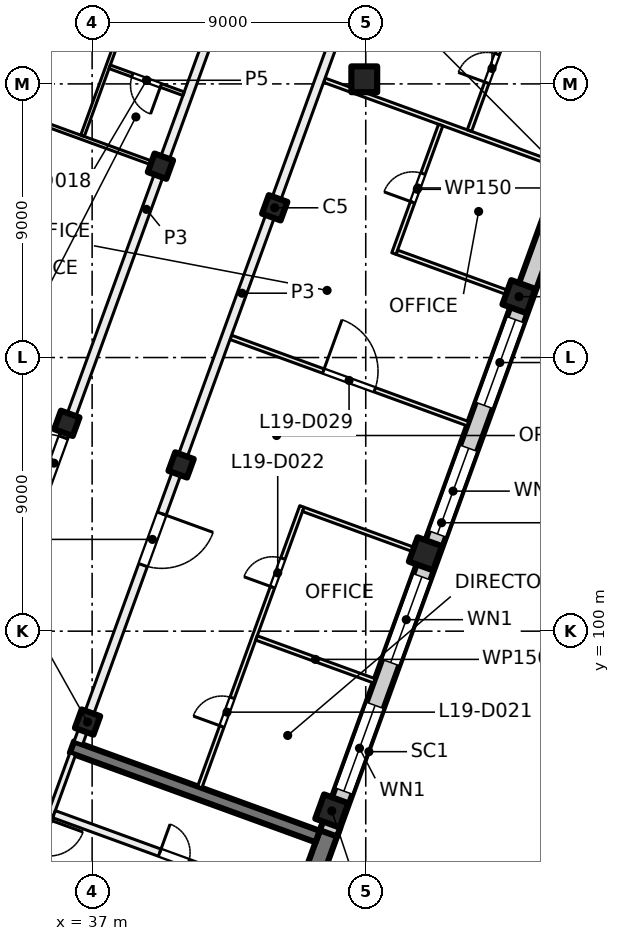
"""IFC4 building model, lengths in metres.
Left out: names, types, materials, properties, quantities, classifications, styles, units other than length and angle.
Written with IfcOpenShell. Run it as: python <this file> out.ifc"""

import sys

from ifc_helpers import new_model, si_unit, direction, frame, frame_2d, origin, origin_2d, place, context, subcontext, project, spatial, rectangle, extrude, element, fill, save


model = new_model("IFC4")
c1 = context("Model", 3, precision=1e-05, world=origin(), true_north=direction((0.0, 1.0)))
c2 = subcontext(c1, "Body", "Model", "MODEL_VIEW")
j1 = project(units=[si_unit("LENGTHUNIT", "METRE"), si_unit("PLANEANGLEUNIT", "RADIAN")], contexts=[c1])
p1 = place(None, origin())
s1 = spatial("IfcSite", under=j1, at=p1, CompositionType="ELEMENT")
p2 = place(p1, origin())
s2 = spatial("IfcBuilding", under=s1, at=p2, CompositionType="ELEMENT")
p3 = place(p2, frame((0.0, 0.0, 85.0)))
s3 = spatial("IfcBuildingStorey", under=s2, at=p3, CompositionType="ELEMENT", Elevation=85.0)
p4 = place(p3, frame((45.952, 118.152, 0.0), z_axis=(0.0, 0.0, 1.0), x_axis=(1.0, 0.0, 0.0)))
e1 = element("IfcColumn", 1, at=p4, inside=s3, PredefinedType="COLUMN", context=c2, shape_type="SweptSolid", body=[
    extrude(rectangle(XDim=0.85, YDim=0.85, at=origin_2d()), origin(), (0.0, 0.0, 1.0), 4.0),
])
for number, where, z_axis, x_axis in (
    (2, (43.006, 113.925, 0.0), (0.0, 0.0, 1.0), (-0.342, -0.94, 0.0)),
    (3, (39.927, 105.468, 0.0), (0.0, 0.0, 1.0), (-0.342, -0.94, 0.0)),
    (4, (36.849, 97.011, 0.0), (0.0, 0.0, 1.0), (-0.342, -0.94, 0.0)),
    (5, (39.247, 115.293, 0.0), (0.0, 0.0, 1.0), (-0.342, -0.94, 0.0)),
    (6, (36.169, 106.836, 0.0), (0.0, 0.0, 1.0), (-0.342, -0.94, 0.0)),
):
    element("IfcColumn", number, at=place(p3, frame(where, z_axis=z_axis, x_axis=x_axis)), inside=s3, PredefinedType="COLUMN", context=c2, shape_type="SweptSolid", body=[
        extrude(rectangle(XDim=0.65, YDim=0.65, at=origin_2d()), origin(), (0.0, 0.0, 1.0), 4.0),
    ])
for number, where, z_axis, x_axis in (
    (7, (51.04, 111.001, 0.0), (0.0, 0.0, 1.0), (-0.342, -0.94, 0.0)),
    (8, (47.962, 102.544, 0.0), (0.0, 0.0, 1.0), (-0.342, -0.94, 0.0)),
    (9, (44.884, 94.087, 0.0), (0.0, 0.0, 1.0), (-0.342, -0.94, 0.0)),
):
    element("IfcColumn", number, at=place(p3, frame(where, z_axis=z_axis, x_axis=x_axis)), inside=s3, PredefinedType="COLUMN", context=c2, shape_type="SweptSolid", body=[
        extrude(rectangle(XDim=0.85, YDim=0.85, at=origin_2d()), origin(), (0.0, 0.0, 1.0), 4.0),
    ])
p5 = place(p3, frame((41.827, 85.249, 0.0), z_axis=(0.0, 0.0, 1.0), x_axis=(0.342017595281, 0.939693548195, 0.0)))
e10 = element("IfcWall", 10, at=p5, inside=s3, PredefinedType="SHEAR", context=c2, shape_type="SweptSolid", body=[
    extrude(rectangle(XDim=8.925, YDim=0.6, at=frame_2d((4.462, 0.0))), origin(), (0.0, 0.0, 1.0), 4.0),
])
p6 = place(p3, frame((44.418, 93.245, 0.0), z_axis=(0.0, 0.0, 1.0), x_axis=(-0.93969060187, 0.342025690201, 0.0)))
e11 = element("IfcWall", 11, at=p6, inside=s3, PredefinedType="SHEAR", context=c2, shape_type="SweptSolid", body=[
    extrude(rectangle(XDim=8.6, YDim=0.4, at=frame_2d((4.3, 0.0))), origin(), (0.0, 0.0, 1.0), 4.0),
])
p7 = place(p3, frame((52.212, 113.783, 0.0), z_axis=(0.0, 0.0, 1.0), x_axis=(-0.34202521188, -0.939690775968, 0.0)))
e12 = element("IfcWall", 12, at=p7, inside=s3, PredefinedType="SOLIDWALL", context=c2, shape_type="SweptSolid", body=[
    extrude(rectangle(XDim=21.745, YDim=0.6, at=frame_2d((10.873, 0.0))), origin(), (0.0, 0.0, 1.0), 3.625),
])
p8 = place(p7, frame((3.765, 0.0, 0.9)))
e13 = element("IfcOpeningElement", 13, at=p8, cuts=e12, PredefinedType="OPENING", context=c2, shape_type="SweptSolid", body=[
    extrude(rectangle(XDim=3.0, YDim=2.4, at=frame_2d((1.5, 1.2))), frame((0.0, 0.31, 0.0), z_axis=(0.0, -1.0, 0.0), x_axis=(1.0, 0.0, 0.0)), (0.0, 0.0, 1.0), 0.62),
])
p9 = place(p7, frame((8.265, 0.0, 0.9)))
e14 = element("IfcOpeningElement", 14, at=p9, cuts=e12, PredefinedType="OPENING", context=c2, shape_type="SweptSolid", body=[
    extrude(rectangle(XDim=3.0, YDim=2.4, at=frame_2d((1.5, 1.2))), frame((0.0, 0.31, 0.0), z_axis=(0.0, -1.0, 0.0), x_axis=(1.0, 0.0, 0.0)), (0.0, 0.0, 1.0), 0.62),
])
p10 = place(p7, frame((12.765, 0.0, 0.9)))
e15 = element("IfcOpeningElement", 15, at=p10, cuts=e12, PredefinedType="OPENING", context=c2, shape_type="SweptSolid", body=[
    extrude(rectangle(XDim=3.0, YDim=2.4, at=frame_2d((1.5, 1.2))), frame((0.0, 0.31, 0.0), z_axis=(0.0, -1.0, 0.0), x_axis=(1.0, 0.0, 0.0)), (0.0, 0.0, 1.0), 0.62),
])
p11 = place(p7, frame((17.265, 0.0, 0.9)))
e16 = element("IfcOpeningElement", 16, at=p11, cuts=e12, PredefinedType="OPENING", context=c2, shape_type="SweptSolid", body=[
    extrude(rectangle(XDim=3.0, YDim=2.4, at=frame_2d((1.5, 1.2))), frame((0.0, 0.31, 0.0), z_axis=(0.0, -1.0, 0.0), x_axis=(1.0, 0.0, 0.0)), (0.0, 0.0, 1.0), 0.62),
])
p12 = place(p3, frame((24.666, 100.669, 0.0), z_axis=(0.0, 0.0, 1.0), x_axis=(0.34201964167, 0.939692803373, 0.0)))
e17 = element("IfcWall", 17, at=p12, inside=s3, PredefinedType="SOLIDWALL", context=c2, shape_type="SweptSolid", body=[
    extrude(rectangle(XDim=32.884, YDim=0.6, at=frame_2d((16.442, 0.0))), origin(), (0.0, 0.0, 1.0), 3.625),
])
p13 = place(p12, frame((1.48, 0.0, 0.9)))
e18 = element("IfcOpeningElement", 18, at=p13, cuts=e17, PredefinedType="OPENING", context=c2, shape_type="SweptSolid", body=[
    extrude(rectangle(XDim=3.0, YDim=2.4, at=frame_2d((1.5, 1.2))), frame((0.0, 0.31, 0.0), z_axis=(0.0, -1.0, 0.0), x_axis=(1.0, 0.0, 0.0)), (0.0, 0.0, 1.0), 0.62),
])
p14 = place(p12, frame((5.98, 0.0, 0.9)))
e19 = element("IfcOpeningElement", 19, at=p14, cuts=e17, PredefinedType="OPENING", context=c2, shape_type="SweptSolid", body=[
    extrude(rectangle(XDim=3.0, YDim=2.4, at=frame_2d((1.5, 1.2))), frame((0.0, 0.31, 0.0), z_axis=(0.0, -1.0, 0.0), x_axis=(1.0, 0.0, 0.0)), (0.0, 0.0, 1.0), 0.62),
])
p15 = place(p12, frame((10.48, 0.0, 0.9)))
e20 = element("IfcOpeningElement", 20, at=p15, cuts=e17, PredefinedType="OPENING", context=c2, shape_type="SweptSolid", body=[
    extrude(rectangle(XDim=3.0, YDim=2.4, at=frame_2d((1.5, 1.2))), frame((0.0, 0.31, 0.0), z_axis=(0.0, -1.0, 0.0), x_axis=(1.0, 0.0, 0.0)), (0.0, 0.0, 1.0), 0.62),
])
p16 = place(p12, frame((14.98, 0.0, 0.9)))
e21 = element("IfcOpeningElement", 21, at=p16, cuts=e17, PredefinedType="OPENING", context=c2, shape_type="SweptSolid", body=[
    extrude(rectangle(XDim=3.0, YDim=2.4, at=frame_2d((1.5, 1.2))), frame((0.0, 0.31, 0.0), z_axis=(0.0, -1.0, 0.0), x_axis=(1.0, 0.0, 0.0)), (0.0, 0.0, 1.0), 0.62),
])
p17 = place(p12, frame((19.48, 0.0, 0.9)))
e22 = element("IfcOpeningElement", 22, at=p17, cuts=e17, PredefinedType="OPENING", context=c2, shape_type="SweptSolid", body=[
    extrude(rectangle(XDim=3.0, YDim=2.4, at=frame_2d((1.5, 1.2))), frame((0.0, 0.31, 0.0), z_axis=(0.0, -1.0, 0.0), x_axis=(1.0, 0.0, 0.0)), (0.0, 0.0, 1.0), 0.62),
])
p18 = place(p12, frame((23.98, 0.0, 0.9)))
e23 = element("IfcOpeningElement", 23, at=p18, cuts=e17, PredefinedType="OPENING", context=c2, shape_type="SweptSolid", body=[
    extrude(rectangle(XDim=3.0, YDim=2.4, at=frame_2d((1.5, 1.2))), frame((0.0, 0.31, 0.0), z_axis=(0.0, -1.0, 0.0), x_axis=(1.0, 0.0, 0.0)), (0.0, 0.0, 1.0), 0.62),
])
p19 = place(p12, frame((28.48, 0.0, 0.9)))
e24 = element("IfcOpeningElement", 24, at=p19, cuts=e17, PredefinedType="OPENING", context=c2, shape_type="SweptSolid", body=[
    extrude(rectangle(XDim=3.0, YDim=2.4, at=frame_2d((1.5, 1.2))), frame((0.0, 0.31, 0.0), z_axis=(0.0, -1.0, 0.0), x_axis=(1.0, 0.0, 0.0)), (0.0, 0.0, 1.0), 0.62),
])
p20 = place(p3, frame((36.362, 95.964, 0.0), z_axis=(0.0, 0.0, 1.0), x_axis=(-0.341995824804, -0.939701471648, 0.0)))
e25 = element("IfcWall", 25, at=p20, inside=s3, PredefinedType="PARTITIONING", context=c2, shape_type="SweptSolid", body=[
    extrude(rectangle(XDim=3.8, YDim=0.2, at=frame_2d((1.9, 0.0))), origin(), (0.0, 0.0, 1.0), 3.625),
])
p21 = place(p20, frame((2.3, 0.0, 0.0)))
e26 = element("IfcOpeningElement", 26, at=p21, cuts=e25, PredefinedType="OPENING", context=c2, shape_type="SweptSolid", body=[
    extrude(rectangle(XDim=1.2, YDim=2.1, at=frame_2d((0.6, 1.05))), frame((0.0, 0.11, 0.0), z_axis=(0.0, -1.0, 0.0), x_axis=(1.0, 0.0, 0.0)), (0.0, 0.0, 1.0), 0.22),
])
p22 = place(p3, frame((35.19, 92.453, 0.0), z_axis=(0.0, 0.0, 1.0), x_axis=(0.939691552312, -0.342023078919, 0.0)))
e27 = element("IfcWall", 27, at=p22, inside=s3, PredefinedType="PARTITIONING", context=c2, shape_type="SweptSolid", body=[
    extrude(rectangle(XDim=8.4, YDim=0.2, at=frame_2d((4.2, 0.0))), origin(), (0.0, 0.0, 1.0), 3.625),
])
p23 = place(p22, frame((5.25, 0.0, 0.0)))
e28 = element("IfcOpeningElement", 28, at=p23, cuts=e27, PredefinedType="OPENING", context=c2, shape_type="SweptSolid", body=[
    extrude(rectangle(XDim=1.5, YDim=2.1, at=frame_2d((0.75, 1.05))), frame((0.0, 0.11, 0.0), z_axis=(0.0, -1.0, 0.0), x_axis=(1.0, 0.0, 0.0)), (0.0, 0.0, 1.0), 0.22),
])
p24 = place(p3, frame((35.746, 93.98, 0.0), z_axis=(0.0, 0.0, 1.0), x_axis=(0.939691552312, -0.342023078919, 0.0)))
e29 = element("IfcWall", 29, at=p24, inside=s3, PredefinedType="PARTITIONING", context=c2, shape_type="SweptSolid", body=[
    extrude(rectangle(XDim=8.4, YDim=0.25, at=frame_2d((4.2, 0.0))), origin(), (0.0, 0.0, 1.0), 3.625),
])
p25 = place(p24, frame((3.7, 0.0, 0.0)))
e30 = element("IfcOpeningElement", 30, at=p25, cuts=e29, PredefinedType="OPENING", context=c2, shape_type="SweptSolid", body=[
    extrude(rectangle(XDim=1.0, YDim=2.1, at=frame_2d((0.5, 1.05))), frame((0.0, 0.135, 0.0), z_axis=(0.0, -1.0, 0.0), x_axis=(1.0, 0.0, 0.0)), (0.0, 0.0, 1.0), 0.27),
])
p26 = place(p3, frame((31.353, 118.166, 0.0), z_axis=(0.0, 0.0, 1.0), x_axis=(0.939687752599, -0.342033518263, 0.0)))
e31 = element("IfcWall", 31, at=p26, inside=s3, PredefinedType="PARTITIONING", context=c2, shape_type="SweptSolid", body=[
    extrude(rectangle(XDim=8.301, YDim=0.125, at=frame_2d((4.15, 0.0))), origin(), (0.0, 0.0, 1.0), 3.625),
])
p27 = place(p3, frame((32.881, 97.657, 0.0), z_axis=(0.0, 0.0, 1.0), x_axis=(0.342017360004, 0.939693633828, 0.0)))
e32 = element("IfcWall", 32, at=p27, inside=s3, PredefinedType="PARTITIONING", context=c2, shape_type="SweptSolid", body=[
    extrude(rectangle(XDim=34.516, YDim=0.3, at=frame_2d((17.258, 0.0))), origin(), (0.0, 0.0, 1.0), 3.625),
])
p28 = place(p27, frame((7.475, 0.0, 0.0)))
e33 = element("IfcOpeningElement", 33, at=p28, cuts=e32, PredefinedType="OPENING", context=c2, shape_type="SweptSolid", body=[
    extrude(rectangle(XDim=1.8, YDim=2.1, at=frame_2d((0.9, 1.05))), frame((0.0, 0.16, 0.0), z_axis=(0.0, -1.0, 0.0), x_axis=(1.0, 0.0, 0.0)), (0.0, 0.0, 1.0), 0.32),
])
p29 = place(p27, frame((24.0, 0.0, 0.0)))
e34 = element("IfcOpeningElement", 34, at=p29, cuts=e32, PredefinedType="OPENING", context=c2, shape_type="SweptSolid", body=[
    extrude(rectangle(XDim=1.0, YDim=2.1, at=frame_2d((0.5, 1.05))), frame((0.0, 0.16, 0.0), z_axis=(0.0, -1.0, 0.0), x_axis=(1.0, 0.0, 0.0)), (0.0, 0.0, 1.0), 0.32),
])
p30 = place(p3, frame((36.684, 116.293, 0.0), z_axis=(0.0, 0.0, 1.0), x_axis=(0.342089829483, 0.939667254173, 0.0)))
e35 = element("IfcWall", 35, at=p30, inside=s3, PredefinedType="PARTITIONING", context=c2, shape_type="SweptSolid", body=[
    extrude(rectangle(XDim=8.875, YDim=0.125, at=frame_2d((4.437, 0.0))), origin(), (0.0, 0.0, 1.0), 3.625),
])
p31 = place(p30, frame((6.266, 0.0, 0.0)))
e36 = element("IfcOpeningElement", 36, at=p31, cuts=e35, PredefinedType="OPENING", context=c2, shape_type="SweptSolid", body=[
    extrude(rectangle(XDim=0.8, YDim=2.1, at=frame_2d((0.4, 1.05))), frame((0.0, 0.073, 0.0), z_axis=(0.0, -1.0, 0.0), x_axis=(1.0, 0.0, 0.0)), (0.0, 0.0, 1.0), 0.145),
])
p32 = place(p30, frame((3.036, 0.0, 0.0)))
e37 = element("IfcOpeningElement", 37, at=p32, cuts=e35, PredefinedType="OPENING", context=c2, shape_type="SweptSolid", body=[
    extrude(rectangle(XDim=0.8, YDim=2.1, at=frame_2d((0.4, 1.05))), frame((0.0, 0.073, 0.0), z_axis=(0.0, -1.0, 0.0), x_axis=(1.0, 0.0, 0.0)), (0.0, 0.0, 1.0), 0.145),
])
p33 = place(p3, frame((40.008, 117.677, 0.0), z_axis=(0.0, 0.0, 1.0), x_axis=(-0.939674895655, 0.342068838798, 0.0)))
e38 = element("IfcWall", 38, at=p33, inside=s3, PredefinedType="PARTITIONING", context=c2, shape_type="SweptSolid", body=[
    extrude(rectangle(XDim=2.587, YDim=0.125, at=frame_2d((1.293, 0.0))), origin(), (0.0, 0.0, 1.0), 3.625),
])
p34 = place(p33, frame((0.793, 0.0, 0.0)))
e39 = element("IfcOpeningElement", 39, at=p34, cuts=e38, PredefinedType="OPENING", context=c2, shape_type="SweptSolid", body=[
    extrude(rectangle(XDim=1.0, YDim=2.1, at=frame_2d((0.5, 1.05))), frame((0.0, 0.073, 0.0), z_axis=(0.0, -1.0, 0.0), x_axis=(1.0, 0.0, 0.0)), (0.0, 0.0, 1.0), 0.145),
])
p35 = place(p3, frame((40.539, 94.87, 0.0), z_axis=(0.0, 0.0, 1.0), x_axis=(0.342082231415, 0.939670020247, 0.0)))
e40 = element("IfcWall", 40, at=p35, inside=s3, PredefinedType="PARTITIONING", context=c2, shape_type="SweptSolid", body=[
    extrude(rectangle(XDim=9.825, YDim=0.15, at=frame_2d((4.912, 0.0))), origin(), (0.0, 0.0, 1.0), 3.625),
])
p36 = place(p35, frame((2.125, 0.0, 0.0)))
e41 = element("IfcOpeningElement", 41, at=p36, cuts=e40, PredefinedType="OPENING", context=c2, shape_type="SweptSolid", body=[
    extrude(rectangle(XDim=1.0, YDim=2.1, at=frame_2d((0.5, 1.05))), frame((0.0, 0.085, 0.0), z_axis=(0.0, -1.0, 0.0), x_axis=(1.0, 0.0, 0.0)), (0.0, 0.0, 1.0), 0.17),
])
p37 = place(p35, frame((7.0, 0.0, 0.0)))
e42 = element("IfcOpeningElement", 42, at=p37, cuts=e40, PredefinedType="OPENING", context=c2, shape_type="SweptSolid", body=[
    extrude(rectangle(XDim=1.0, YDim=2.1, at=frame_2d((0.5, 1.05))), frame((0.0, 0.085, 0.0), z_axis=(0.0, -1.0, 0.0), x_axis=(1.0, 0.0, 0.0)), (0.0, 0.0, 1.0), 0.17),
])
p38 = place(p3, frame((41.561, 109.663, 0.0), z_axis=(0.0, 0.0, 1.0), x_axis=(0.939673986983, -0.342071334939, 0.0)))
e43 = element("IfcWall", 43, at=p38, inside=s3, PredefinedType="PARTITIONING", context=c2, shape_type="SweptSolid", body=[
    extrude(rectangle(XDim=8.3, YDim=0.15, at=frame_2d((4.15, 0.0))), origin(), (0.0, 0.0, 1.0), 3.625),
])
p39 = place(p38, frame((3.24, 0.0, 0.0)))
e44 = element("IfcOpeningElement", 44, at=p39, cuts=e43, PredefinedType="OPENING", context=c2, shape_type="SweptSolid", body=[
    extrude(rectangle(XDim=1.8, YDim=2.1, at=frame_2d((0.9, 1.05))), frame((0.0, 0.085, 0.0), z_axis=(0.0, -1.0, 0.0), x_axis=(1.0, 0.0, 0.0)), (0.0, 0.0, 1.0), 0.17),
])
p40 = place(p3, frame((42.405, 99.777, 0.0), z_axis=(0.0, 0.0, 1.0), x_axis=(0.939765774653, -0.341819087808, 0.0)))
e45 = element("IfcWall", 45, at=p40, inside=s3, PredefinedType="PARTITIONING", context=c2, shape_type="SweptSolid", body=[
    extrude(rectangle(XDim=4.125, YDim=0.15, at=frame_2d((2.063, 0.0))), origin(), (0.0, 0.0, 1.0), 3.625),
])
p41 = place(p3, frame((44.639, 118.12, 0.0), z_axis=(0.0, 0.0, 1.0), x_axis=(0.939669707102, -0.342083091593, 0.0)))
e46 = element("IfcWall", 46, at=p41, inside=s3, PredefinedType="PARTITIONING", context=c2, shape_type="SweptSolid", body=[
    extrude(rectangle(XDim=8.589, YDim=0.15, at=frame_2d((4.295, 0.0))), origin(), (0.0, 0.0, 1.0), 3.625),
])
p42 = place(p3, frame((50.899, 111.052, 0.0), z_axis=(0.0, 0.0, 1.0), x_axis=(-0.93970873465, 0.341975867603, 0.0)))
e47 = element("IfcWall", 47, at=p42, inside=s3, PredefinedType="PARTITIONING", context=c2, shape_type="SweptSolid", body=[
    extrude(rectangle(XDim=4.126, YDim=0.15, at=frame_2d((2.063, 0.0))), origin(), (0.0, 0.0, 1.0), 3.625),
])
p43 = place(p3, frame((47.314, 125.909, 0.0), z_axis=(0.0, 0.0, 1.0), x_axis=(-0.342010770371, -0.939696032209, 0.0)))
e48 = element("IfcWall", 48, at=p43, inside=s3, PredefinedType="PARTITIONING", context=c2, shape_type="SweptSolid", body=[
    extrude(rectangle(XDim=31.485, YDim=0.3, at=frame_2d((15.742, 0.0))), origin(), (0.0, 0.0, 1.0), 3.625),
])
p44 = place(p43, frame((23.459, 0.0, 0.0)))
e49 = element("IfcOpeningElement", 49, at=p44, cuts=e48, PredefinedType="OPENING", context=c2, shape_type="SweptSolid", body=[
    extrude(rectangle(XDim=1.8, YDim=2.1, at=frame_2d((0.9, 1.05))), frame((0.0, 0.16, 0.0), z_axis=(0.0, -1.0, 0.0), x_axis=(1.0, 0.0, 0.0)), (0.0, 0.0, 1.0), 0.32),
])
p45 = place(p43, frame((5.484, 0.0, 0.0)))
e50 = element("IfcOpeningElement", 50, at=p45, cuts=e48, PredefinedType="OPENING", context=c2, shape_type="SweptSolid", body=[
    extrude(rectangle(XDim=1.0, YDim=2.1, at=frame_2d((0.5, 1.05))), frame((0.0, 0.16, 0.0), z_axis=(0.0, -1.0, 0.0), x_axis=(1.0, 0.0, 0.0)), (0.0, 0.0, 1.0), 0.32),
])
p46 = place(p3, frame((43.944, 104.006, 0.0), z_axis=(0.0, 0.0, 1.0), x_axis=(0.939689717042, -0.34202812119, 0.0)))
e51 = element("IfcWall", 51, at=p46, inside=s3, PredefinedType="PARTITIONING", context=c2, shape_type="SweptSolid", body=[
    extrude(rectangle(XDim=4.126, YDim=0.15, at=frame_2d((2.063, 0.0))), origin(), (0.0, 0.0, 1.0), 3.625),
])
p47 = place(p3, frame((46.926, 112.419, 0.0), z_axis=(0.0, 0.0, 1.0), x_axis=(0.342056723843, 0.93967930576, 0.0)))
e52 = element("IfcWall", 52, at=p47, inside=s3, PredefinedType="PARTITIONING", context=c2, shape_type="SweptSolid", body=[
    extrude(rectangle(XDim=4.5, YDim=0.15, at=frame_2d((2.25, 0.0))), origin(), (0.0, 0.0, 1.0), 3.625),
])
p48 = place(p47, frame((1.797, 0.0, 0.0)))
e53 = element("IfcOpeningElement", 53, at=p48, cuts=e52, PredefinedType="OPENING", context=c2, shape_type="SweptSolid", body=[
    extrude(rectangle(XDim=1.0, YDim=2.1, at=frame_2d((0.5, 1.05))), frame((0.0, 0.085, 0.0), z_axis=(0.0, -1.0, 0.0), x_axis=(1.0, 0.0, 0.0)), (0.0, 0.0, 1.0), 0.17),
])
p49 = place(p3, frame((49.41, 116.463, 0.0), z_axis=(0.0, 0.0, 1.0), x_axis=(0.341837690029, 0.939759008297, 0.0)))
e54 = element("IfcWall", 54, at=p49, inside=s3, PredefinedType="PARTITIONING", context=c2, shape_type="SweptSolid", body=[
    extrude(rectangle(XDim=4.35, YDim=0.15, at=frame_2d((2.175, 0.0))), origin(), (0.0, 0.0, 1.0), 3.625),
])
p50 = place(p49, frame((1.675, 0.0, 0.0)))
e55 = element("IfcOpeningElement", 55, at=p50, cuts=e54, PredefinedType="OPENING", context=c2, shape_type="SweptSolid", body=[
    extrude(rectangle(XDim=1.0, YDim=2.1, at=frame_2d((0.5, 1.05))), frame((0.0, 0.085, 0.0), z_axis=(0.0, -1.0, 0.0), x_axis=(1.0, 0.0, 0.0)), (0.0, 0.0, 1.0), 0.17),
])
p51 = place(p8, origin())
e56 = element("IfcWindow", 56, at=p51, inside=s3, PartitioningType="SINGLE_PANEL", PredefinedType="WINDOW", context=c2, shape_type="SweptSolid", body=[
    extrude(rectangle(XDim=3.0, YDim=2.4, at=frame_2d((1.5, 1.2))), frame((0.0, 0.03, 0.0), z_axis=(0.0, -1.0, 0.0), x_axis=(1.0, 0.0, 0.0)), (0.0, 0.0, 1.0), 0.06),
])
fill(e13, e56)
p52 = place(p9, origin())
e57 = element("IfcWindow", 57, at=p52, inside=s3, PartitioningType="SINGLE_PANEL", PredefinedType="WINDOW", context=c2, shape_type="SweptSolid", body=[
    extrude(rectangle(XDim=3.0, YDim=2.4, at=frame_2d((1.5, 1.2))), frame((0.0, 0.03, 0.0), z_axis=(0.0, -1.0, 0.0), x_axis=(1.0, 0.0, 0.0)), (0.0, 0.0, 1.0), 0.06),
])
fill(e14, e57)
p53 = place(p10, origin())
e58 = element("IfcWindow", 58, at=p53, inside=s3, PartitioningType="SINGLE_PANEL", PredefinedType="WINDOW", context=c2, shape_type="SweptSolid", body=[
    extrude(rectangle(XDim=3.0, YDim=2.4, at=frame_2d((1.5, 1.2))), frame((0.0, 0.03, 0.0), z_axis=(0.0, -1.0, 0.0), x_axis=(1.0, 0.0, 0.0)), (0.0, 0.0, 1.0), 0.06),
])
fill(e15, e58)
p54 = place(p11, origin())
e59 = element("IfcWindow", 59, at=p54, inside=s3, PartitioningType="SINGLE_PANEL", PredefinedType="WINDOW", context=c2, shape_type="SweptSolid", body=[
    extrude(rectangle(XDim=3.0, YDim=2.4, at=frame_2d((1.5, 1.2))), frame((0.0, 0.03, 0.0), z_axis=(0.0, -1.0, 0.0), x_axis=(1.0, 0.0, 0.0)), (0.0, 0.0, 1.0), 0.06),
])
fill(e16, e59)
p55 = place(p25, origin())
e60 = element("IfcDoor", 60, at=p55, inside=s3, OperationType="SINGLE_SWING_RIGHT", PredefinedType="DOOR", context=c2, shape_type="SweptSolid", body=[
    extrude(rectangle(XDim=1.0, YDim=2.1, at=frame_2d((0.5, 1.05))), frame((0.0, 0.025, 0.0), z_axis=(0.0, -1.0, 0.0), x_axis=(1.0, 0.0, 0.0)), (0.0, 0.0, 1.0), 0.05),
])
fill(e30, e60)
p56 = place(p28, origin())
e61 = element("IfcDoor", 61, at=p56, inside=s3, OperationType="DOUBLE_DOOR_SINGLE_SWING", PredefinedType="DOOR", context=c2, shape_type="SweptSolid", body=[
    extrude(rectangle(XDim=1.8, YDim=2.1, at=frame_2d((0.9, 1.05))), frame((0.0, 0.025, 0.0), z_axis=(0.0, -1.0, 0.0), x_axis=(1.0, 0.0, 0.0)), (0.0, 0.0, 1.0), 0.05),
])
fill(e33, e61)
p57 = place(p34, origin())
e62 = element("IfcDoor", 62, at=p57, inside=s3, OperationType="SINGLE_SWING_LEFT", PredefinedType="DOOR", context=c2, shape_type="SweptSolid", body=[
    extrude(rectangle(XDim=1.0, YDim=2.1, at=frame_2d((0.5, 1.05))), frame((0.0, 0.025, 0.0), z_axis=(0.0, -1.0, 0.0), x_axis=(1.0, 0.0, 0.0)), (0.0, 0.0, 1.0), 0.05),
])
fill(e39, e62)
p58 = place(p36, origin())
e63 = element("IfcDoor", 63, at=p58, inside=s3, OperationType="SINGLE_SWING_LEFT", PredefinedType="DOOR", context=c2, shape_type="SweptSolid", body=[
    extrude(rectangle(XDim=1.0, YDim=2.1, at=frame_2d((0.5, 1.05))), frame((0.0, 0.025, 0.0), z_axis=(0.0, -1.0, 0.0), x_axis=(1.0, 0.0, 0.0)), (0.0, 0.0, 1.0), 0.05),
])
fill(e41, e63)
p59 = place(p37, origin())
e64 = element("IfcDoor", 64, at=p59, inside=s3, OperationType="SINGLE_SWING_LEFT", PredefinedType="DOOR", context=c2, shape_type="SweptSolid", body=[
    extrude(rectangle(XDim=1.0, YDim=2.1, at=frame_2d((0.5, 1.05))), frame((0.0, 0.025, 0.0), z_axis=(0.0, -1.0, 0.0), x_axis=(1.0, 0.0, 0.0)), (0.0, 0.0, 1.0), 0.05),
])
fill(e42, e64)
p60 = place(p44, origin())
e65 = element("IfcDoor", 65, at=p60, inside=s3, OperationType="DOUBLE_DOOR_SINGLE_SWING", PredefinedType="DOOR", context=c2, shape_type="SweptSolid", body=[
    extrude(rectangle(XDim=1.8, YDim=2.1, at=frame_2d((0.9, 1.05))), frame((0.0, 0.025, 0.0), z_axis=(0.0, -1.0, 0.0), x_axis=(1.0, 0.0, 0.0)), (0.0, 0.0, 1.0), 0.05),
])
fill(e49, e65)
p61 = place(p48, origin())
e66 = element("IfcDoor", 66, at=p61, inside=s3, OperationType="SINGLE_SWING_RIGHT", PredefinedType="DOOR", context=c2, shape_type="SweptSolid", body=[
    extrude(rectangle(XDim=1.0, YDim=2.1, at=frame_2d((0.5, 1.05))), frame((0.0, 0.025, 0.0), z_axis=(0.0, -1.0, 0.0), x_axis=(1.0, 0.0, 0.0)), (0.0, 0.0, 1.0), 0.05),
])
fill(e53, e66)
p62 = place(p50, origin())
e67 = element("IfcDoor", 67, at=p62, inside=s3, OperationType="SINGLE_SWING_LEFT", PredefinedType="DOOR", context=c2, shape_type="SweptSolid", body=[
    extrude(rectangle(XDim=1.0, YDim=2.1, at=frame_2d((0.5, 1.05))), frame((0.0, 0.025, 0.0), z_axis=(0.0, -1.0, 0.0), x_axis=(1.0, 0.0, 0.0)), (0.0, 0.0, 1.0), 0.05),
])
fill(e55, e67)
p63 = place(p39, origin())
e68 = element("IfcDoor", 68, at=p63, inside=s3, OperationType="DOUBLE_DOOR_SINGLE_SWING", PredefinedType="DOOR", context=c2, shape_type="SweptSolid", body=[
    extrude(rectangle(XDim=1.8, YDim=2.1, at=frame_2d((0.9, 1.05))), frame((0.0, 0.025, 0.0), z_axis=(0.0, -1.0, 0.0), x_axis=(1.0, 0.0, 0.0)), (0.0, 0.0, 1.0), 0.05),
])
fill(e44, e68)
save(model, sys.argv[1])
